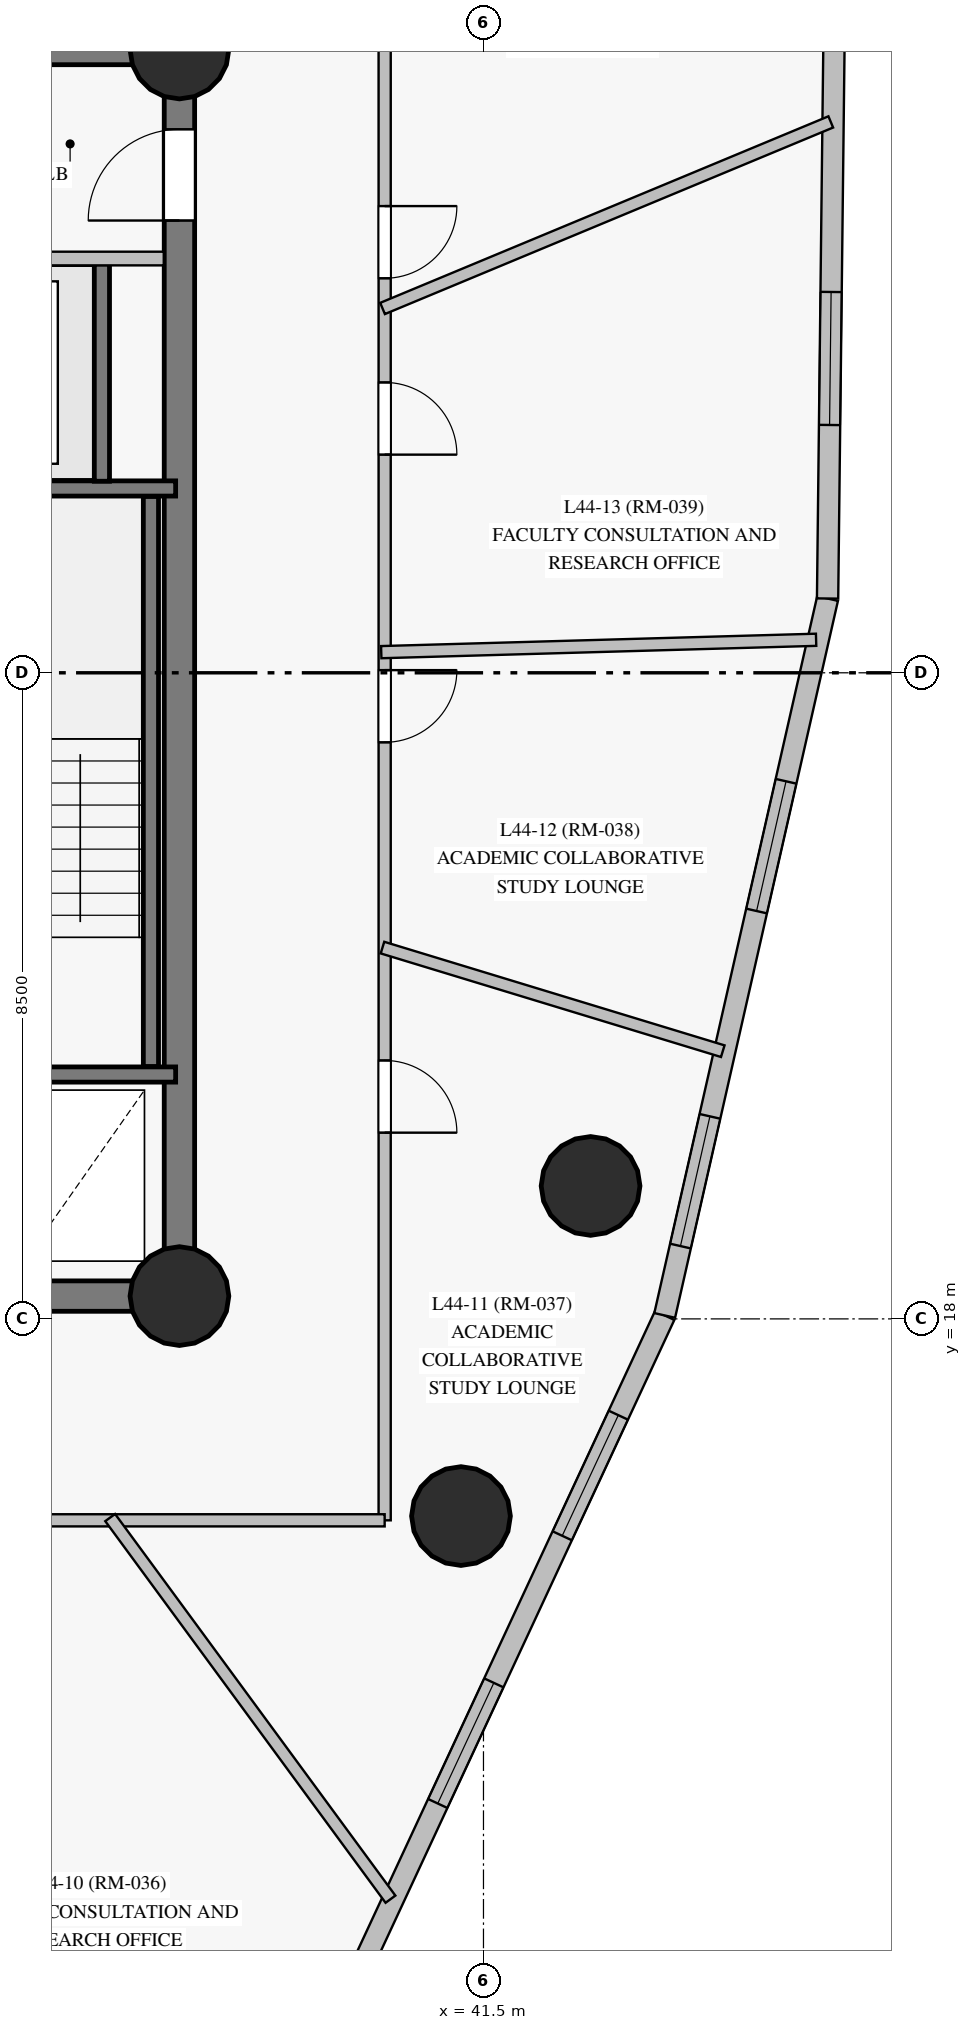
"""IFC4 building model, lengths in metres.
Left out: names, types, materials, properties, quantities, classifications, styles, units other than length and angle.
Written with IfcOpenShell. Run it as: python <this file> out.ifc"""

import sys

from ifc_helpers import new_model, si_unit, direction, frame, frame_2d, origin, origin_with_axes, origin_2d, place, context, subcontext, project, spatial, rectangle, circle, extrude, source, transform, mapped, element, fill, save


model = new_model("IFC4")
c1 = context("Model", 3, precision=1e-05, world=origin(), true_north=direction((0.0, 1.0)))
c2 = subcontext(c1, "Body", "Model", "MODEL_VIEW")
j1 = project(units=[si_unit("LENGTHUNIT", "METRE"), si_unit("PLANEANGLEUNIT", "RADIAN")], contexts=[c1])
p1 = place(None, origin())
s1 = spatial("IfcSite", under=j1, at=p1, CompositionType="ELEMENT")
p2 = place(p1, origin())
s2 = spatial("IfcBuilding", under=s1, at=p2, CompositionType="ELEMENT")
p3 = place(p2, frame((0.0, 0.0, 156.55)))
s3 = spatial("IfcBuildingStorey", under=s2, at=p3, CompositionType="ELEMENT", Elevation=156.55)
p4 = place(p3, frame((26.55, 18.3, 0.0), z_axis=(0.0, 0.0, 1.0), x_axis=(1.0, 0.0, 0.0)))
e1 = element("IfcWall", 1, at=p4, inside=s3, PredefinedType="SHEAR", context=c2, shape_type="SweptSolid", body=[
    extrude(rectangle(XDim=10.95, YDim=0.4, at=frame_2d((5.475, 0.0))), origin(), (0.0, 0.0, 1.0), 2.825),
])
p5 = place(p4, frame((4.55, 0.0, 0.0)))
e2 = element("IfcOpeningElement", 2, at=p5, cuts=e1, PredefinedType="OPENING", context=c2, shape_type="SweptSolid", body=[
    extrude(rectangle(XDim=1.4, YDim=2.2, at=frame_2d((0.7, 1.1))), frame((0.0, 0.21, 0.0), z_axis=(0.0, -1.0, 0.0), x_axis=(1.0, 0.0, 0.0)), (0.0, 0.0, 1.0), 0.42),
])
p6 = place(p3, frame((37.5, 18.3, 0.0), z_axis=(0.0, 0.0, 1.0), x_axis=(0.0, 1.0, 0.0)))
e3 = element("IfcWall", 3, at=p6, inside=s3, PredefinedType="SHEAR", context=c2, shape_type="SweptSolid", body=[
    extrude(rectangle(XDim=16.4, YDim=0.4, at=frame_2d((8.2, 0.0))), origin(), (0.0, 0.0, 1.0), 2.825),
])
p7 = place(p6, frame((14.15, 0.0, 0.0)))
e4 = element("IfcOpeningElement", 4, at=p7, cuts=e3, PredefinedType="OPENING", context=c2, shape_type="SweptSolid", body=[
    extrude(rectangle(XDim=1.2, YDim=2.15, at=frame_2d((0.6, 1.075))), frame((0.0, 0.21, 0.0), z_axis=(0.0, -1.0, 0.0), x_axis=(1.0, 0.0, 0.0)), (0.0, 0.0, 1.0), 0.42),
])
p8 = place(p3, frame((37.5, 34.7, 0.0), z_axis=(0.0, 0.0, 1.0), x_axis=(-1.0, 0.0, 0.0)))
e5 = element("IfcWall", 5, at=p8, inside=s3, PredefinedType="SHEAR", context=c2, shape_type="SweptSolid", body=[
    extrude(rectangle(XDim=10.95, YDim=0.4, at=frame_2d((5.475, 0.0))), origin(), (0.0, 0.0, 1.0), 2.825),
])
p9 = place(p8, frame((2.15, 0.0, 0.0)))
e6 = element("IfcOpeningElement", 6, at=p9, cuts=e5, PredefinedType="OPENING", context=c2, shape_type="SweptSolid", body=[
    extrude(rectangle(XDim=1.2, YDim=2.15, at=frame_2d((0.6, 1.075))), frame((0.0, 0.21, 0.0), z_axis=(0.0, -1.0, 0.0), x_axis=(1.0, 0.0, 0.0)), (0.0, 0.0, 1.0), 0.42),
])
p10 = place(p8, frame((6.35, 0.0, 0.0)))
e7 = element("IfcOpeningElement", 7, at=p10, cuts=e5, PredefinedType="OPENING", context=c2, shape_type="SweptSolid", body=[
    extrude(rectangle(XDim=1.1, YDim=2.15, at=frame_2d((0.55, 1.075))), frame((0.0, 0.21, 0.0), z_axis=(0.0, -1.0, 0.0), x_axis=(1.0, 0.0, 0.0)), (0.0, 0.0, 1.0), 0.42),
])
m1 = source(origin_with_axes(), c2, "Body", "SweptSolid", [
    extrude(circle(Radius=0.65, at=origin_2d()), origin(), (0.0, 0.0, 1.0), 3.05),
])
for number, where, z_axis, x_axis in (
    (8, (37.5, 18.3, 0.0), (0.0, 0.0, 1.0), (1.0, 0.0, 0.0)),
    (9, (37.5, 34.7, 0.0), (0.0, 0.0, 1.0), (1.0, 0.0, 0.0)),
    (10, (42.909, 19.749, 0.0), (0.0, 0.0, 1.0), (1.0, 0.0, 0.0)),
    (11, (41.204, 15.406, 0.0), (0.0, 0.0, 1.0), (1.0, 0.0, 0.0)),
):
    element("IfcColumn", number, at=place(p3, frame(where, z_axis=z_axis, x_axis=x_axis)), inside=s3, PredefinedType="COLUMN", context=c2, shape_type="MappedRepresentation", body=[
        mapped(m1, transform((0.0, 0.0, 0.0), scale=1.0)),
    ])
p11 = place(p3, frame((38.012, 5.417, 0.0), z_axis=(0.0, 0.0, 1.0), x_axis=(0.421677791248, 0.906745741853, 0.0)))
e12 = element("IfcWall", 12, at=p11, inside=s3, PredefinedType="SOLIDWALL", context=c2, shape_type="SweptSolid", body=[
    extrude(rectangle(XDim=13.927, YDim=0.28, at=frame_2d((6.963, 0.0))), origin(), (0.0, 0.0, 1.0), 2.825),
])
p12 = place(p11, frame((1.884, 0.0, 0.85)))
e13 = element("IfcOpeningElement", 13, at=p12, cuts=e12, PredefinedType="OPENING", context=c2, shape_type="SweptSolid", body=[
    extrude(rectangle(XDim=1.75, YDim=1.65, at=frame_2d((0.875, 0.825))), frame((0.0, 0.15, 0.0), z_axis=(0.0, -1.0, 0.0), x_axis=(1.0, 0.0, 0.0)), (0.0, 0.0, 1.0), 0.3),
])
p13 = place(p11, frame((6.846, 0.0, 0.85)))
e14 = element("IfcOpeningElement", 14, at=p13, cuts=e12, PredefinedType="OPENING", context=c2, shape_type="SweptSolid", body=[
    extrude(rectangle(XDim=1.75, YDim=1.65, at=frame_2d((0.875, 0.825))), frame((0.0, 0.15, 0.0), z_axis=(0.0, -1.0, 0.0), x_axis=(1.0, 0.0, 0.0)), (0.0, 0.0, 1.0), 0.3),
])
p14 = place(p11, frame((10.729, 0.0, 0.85)))
e15 = element("IfcOpeningElement", 15, at=p14, cuts=e12, PredefinedType="OPENING", context=c2, shape_type="SweptSolid", body=[
    extrude(rectangle(XDim=1.75, YDim=1.65, at=frame_2d((0.875, 0.825))), frame((0.0, 0.15, 0.0), z_axis=(0.0, -1.0, 0.0), x_axis=(1.0, 0.0, 0.0)), (0.0, 0.0, 1.0), 0.3),
])
p15 = place(p3, frame((43.884, 18.045, 0.0), z_axis=(0.0, 0.0, 1.0), x_axis=(0.221543643077, 0.975150457218, 0.0)))
e16 = element("IfcWall", 16, at=p15, inside=s3, PredefinedType="SOLIDWALL", context=c2, shape_type="SweptSolid", body=[
    extrude(rectangle(XDim=9.672, YDim=0.28, at=frame_2d((4.836, 0.0))), origin(), (0.0, 0.0, 1.0), 2.825),
])
p16 = place(p15, frame((0.936, 0.0, 0.85)))
e17 = element("IfcOpeningElement", 17, at=p16, cuts=e16, PredefinedType="OPENING", context=c2, shape_type="SweptSolid", body=[
    extrude(rectangle(XDim=1.75, YDim=1.65, at=frame_2d((0.875, 0.825))), frame((0.0, 0.15, 0.0), z_axis=(0.0, -1.0, 0.0), x_axis=(1.0, 0.0, 0.0)), (0.0, 0.0, 1.0), 0.3),
])
p17 = place(p15, frame((5.456, 0.0, 0.85)))
e18 = element("IfcOpeningElement", 18, at=p17, cuts=e16, PredefinedType="OPENING", context=c2, shape_type="SweptSolid", body=[
    extrude(rectangle(XDim=1.75, YDim=1.65, at=frame_2d((0.875, 0.825))), frame((0.0, 0.15, 0.0), z_axis=(0.0, -1.0, 0.0), x_axis=(1.0, 0.0, 0.0)), (0.0, 0.0, 1.0), 0.3),
])
p18 = place(p3, frame((46.027, 27.477, 0.0), z_axis=(0.0, 0.0, 1.0), x_axis=(0.011517670731, 0.999933669431, 0.0)))
e19 = element("IfcWall", 19, at=p18, inside=s3, PredefinedType="SOLIDWALL", context=c2, shape_type="SweptSolid", body=[
    extrude(rectangle(XDim=13.927, YDim=0.28, at=frame_2d((6.963, 0.0))), origin(), (0.0, 0.0, 1.0), 2.825),
])
p19 = place(p18, frame((2.283, 0.0, 0.85)))
e20 = element("IfcOpeningElement", 20, at=p19, cuts=e19, PredefinedType="OPENING", context=c2, shape_type="SweptSolid", body=[
    extrude(rectangle(XDim=1.75, YDim=1.65, at=frame_2d((0.875, 0.825))), frame((0.0, 0.15, 0.0), z_axis=(0.0, -1.0, 0.0), x_axis=(1.0, 0.0, 0.0)), (0.0, 0.0, 1.0), 0.3),
])
p20 = place(p18, frame((9.018, 0.0, 0.85)))
e21 = element("IfcOpeningElement", 21, at=p20, cuts=e19, PredefinedType="OPENING", context=c2, shape_type="SweptSolid", body=[
    extrude(rectangle(XDim=1.75, YDim=1.65, at=frame_2d((0.875, 0.825))), frame((0.0, 0.15, 0.0), z_axis=(0.0, -1.0, 0.0), x_axis=(1.0, 0.0, 0.0)), (0.0, 0.0, 1.0), 0.3),
])
p21 = place(p3, frame((37.125, 21.32, 0.0), z_axis=(0.0, 0.0, 1.0), x_axis=(0.0, 1.0, 0.0)))
e22 = element("IfcWall", 22, at=p21, inside=s3, PredefinedType="SHEAR", context=c2, shape_type="SweptSolid", body=[
    extrude(rectangle(XDim=7.5, YDim=0.2, at=frame_2d((3.75, 0.0))), origin(), (0.0, 0.0, 1.0), 2.825),
])
for number, where, z_axis, x_axis in (
    (23, (33.455, 21.215, 0.0), (0.0, 0.0, 1.0), (1.0, 0.0, 0.0)),
    (24, (33.455, 28.925, 0.0), (0.0, 0.0, 1.0), (1.0, 0.0, 0.0)),
):
    element("IfcWall", number, at=place(p3, frame(where, z_axis=z_axis, x_axis=x_axis)), inside=s3, PredefinedType="SHEAR", context=c2, shape_type="SweptSolid", body=[
        extrude(rectangle(XDim=3.995, YDim=0.2, at=frame_2d((1.998, 0.0))), origin(), (0.0, 0.0, 1.0), 2.825),
    ])
p22 = place(p3, frame((36.48, 29.02, 0.0), z_axis=(0.0, 0.0, 1.0), x_axis=(0.0, 1.0, 0.0)))
e25 = element("IfcWall", 25, at=p22, inside=s3, PredefinedType="SHEAR", context=c2, shape_type="SweptSolid", body=[
    extrude(rectangle(XDim=2.86, YDim=0.2, at=frame_2d((1.43, 0.0))), origin(), (0.0, 0.0, 1.0), 2.825),
])
p23 = place(p3, frame((40.2, 37.65, 0.0), z_axis=(0.0, 0.0, 1.0), x_axis=(0.0, -1.0, 0.0)))
e26 = element("IfcWall", 26, at=p23, inside=s3, PredefinedType="PARTITIONING", context=c2, shape_type="SweptSolid", body=[
    extrude(rectangle(XDim=22.3, YDim=0.16, at=frame_2d((11.15, 0.0))), origin(), (0.0, 0.0, 1.0), 2.375),
])
p24 = place(p23, frame((16.25, 0.0, 0.0)))
e27 = element("IfcOpeningElement", 27, at=p24, cuts=e26, PredefinedType="OPENING", context=c2, shape_type="SweptSolid", body=[
    extrude(rectangle(XDim=0.95, YDim=2.15, at=frame_2d((0.475, 1.075))), frame((0.0, 0.09, 0.0), z_axis=(0.0, -1.0, 0.0), x_axis=(1.0, 0.0, 0.0)), (0.0, 0.0, 1.0), 0.18),
])
p25 = place(p23, frame((11.115, 0.0, 0.0)))
e28 = element("IfcOpeningElement", 28, at=p25, cuts=e26, PredefinedType="OPENING", context=c2, shape_type="SweptSolid", body=[
    extrude(rectangle(XDim=0.95, YDim=2.15, at=frame_2d((0.475, 1.075))), frame((0.0, 0.09, 0.0), z_axis=(0.0, -1.0, 0.0), x_axis=(1.0, 0.0, 0.0)), (0.0, 0.0, 1.0), 0.18),
])
p26 = place(p23, frame((7.33, 0.0, 0.0)))
e29 = element("IfcOpeningElement", 29, at=p26, cuts=e26, PredefinedType="OPENING", context=c2, shape_type="SweptSolid", body=[
    extrude(rectangle(XDim=0.95, YDim=2.15, at=frame_2d((0.475, 1.075))), frame((0.0, 0.09, 0.0), z_axis=(0.0, -1.0, 0.0), x_axis=(1.0, 0.0, 0.0)), (0.0, 0.0, 1.0), 0.18),
])
p27 = place(p23, frame((5.01, 0.0, 0.0)))
e30 = element("IfcOpeningElement", 30, at=p27, cuts=e26, PredefinedType="OPENING", context=c2, shape_type="SweptSolid", body=[
    extrude(rectangle(XDim=0.95, YDim=2.15, at=frame_2d((0.475, 1.075))), frame((0.0, 0.09, 0.0), z_axis=(0.0, -1.0, 0.0), x_axis=(1.0, 0.0, 0.0)), (0.0, 0.0, 1.0), 0.18),
])
p28 = place(p3, frame((40.2, 15.35, 0.0), z_axis=(0.0, 0.0, 1.0), x_axis=(-1.0, 0.0, 0.0)))
e31 = element("IfcWall", 31, at=p28, inside=s3, PredefinedType="PARTITIONING", context=c2, shape_type="SweptSolid", body=[
    extrude(rectangle(XDim=10.65, YDim=0.16, at=frame_2d((5.325, 0.0))), origin(), (0.0, 0.0, 1.0), 2.275),
])
p29 = place(p28, frame((9.047, 0.0, 0.0)))
e32 = element("IfcOpeningElement", 32, at=p29, cuts=e31, PredefinedType="OPENING", context=c2, shape_type="SweptSolid", body=[
    extrude(rectangle(XDim=0.95, YDim=2.15, at=frame_2d((0.475, 1.075))), frame((0.0, 0.09, 0.0), z_axis=(0.0, -1.0, 0.0), x_axis=(1.0, 0.0, 0.0)), (0.0, 0.0, 1.0), 0.18),
])
p30 = place(p28, frame((4.85, 0.0, 0.0)))
e33 = element("IfcOpeningElement", 33, at=p30, cuts=e31, PredefinedType="OPENING", context=c2, shape_type="SweptSolid", body=[
    extrude(rectangle(XDim=0.95, YDim=2.15, at=frame_2d((0.475, 1.075))), frame((0.0, 0.09, 0.0), z_axis=(0.0, -1.0, 0.0), x_axis=(1.0, 0.0, 0.0)), (0.0, 0.0, 1.0), 0.18),
])
p31 = place(p3, frame((40.172, 31.293, 0.0), z_axis=(0.0, 0.0, 1.0), x_axis=(0.923236300971, 0.38423265422, 0.0)))
e34 = element("IfcWall", 34, at=p31, inside=s3, PredefinedType="PARTITIONING", context=c2, shape_type="SweptSolid", body=[
    extrude(rectangle(XDim=6.387, YDim=0.16, at=frame_2d((3.193, 0.0))), origin(), (0.0, 0.0, 1.0), 2.825),
])
p32 = place(p3, frame((36.589, 15.386, 0.0), z_axis=(0.0, 0.0, 1.0), x_axis=(0.591975139888, -0.805956223224, 0.0)))
e35 = element("IfcWall", 35, at=p32, inside=s3, PredefinedType="PARTITIONING", context=c2, shape_type="SweptSolid", body=[
    extrude(rectangle(XDim=6.229, YDim=0.16, at=frame_2d((3.115, 0.0))), origin(), (0.0, 0.0, 1.0), 2.825),
])
p33 = place(p3, frame((40.155, 26.771, 0.0), z_axis=(0.0, 0.0, 1.0), x_axis=(0.999595142598, 0.028452607866, 0.0)))
e36 = element("IfcWall", 36, at=p33, inside=s3, PredefinedType="PARTITIONING", context=c2, shape_type="SweptSolid", body=[
    extrude(rectangle(XDim=5.723, YDim=0.16, at=frame_2d((2.862, 0.0))), origin(), (0.0, 0.0, 1.0), 2.825),
])
p34 = place(p3, frame((40.171, 22.885, 0.0), z_axis=(0.0, 0.0, 1.0), x_axis=(0.956656819461, -0.291217667352, 0.0)))
e37 = element("IfcWall", 37, at=p34, inside=s3, PredefinedType="PARTITIONING", context=c2, shape_type="SweptSolid", body=[
    extrude(rectangle(XDim=4.68, YDim=0.16, at=frame_2d((2.34, 0.0))), origin(), (0.0, 0.0, 1.0), 2.825),
])
p35 = place(p3, frame((33.535, 31.95, 0.0), z_axis=(0.0, 0.0, 1.0), x_axis=(1.0, 0.0, 0.0)))
e38 = element("IfcWall", 38, at=p35, inside=s3, PredefinedType="PARTITIONING", context=c2, shape_type="SweptSolid", body=[
    extrude(rectangle(XDim=3.759, YDim=0.18, at=frame_2d((1.879, 0.0))), origin(), (0.0, 0.0, 1.0), 2.825),
])
p36 = place(p35, frame((0.9, 0.0, 0.0)))
e39 = element("IfcOpeningElement", 39, at=p36, cuts=e38, PredefinedType="OPENING", context=c2, shape_type="SweptSolid", body=[
    extrude(rectangle(XDim=1.3, YDim=2.2, at=frame_2d((0.65, 1.1))), frame((0.0, 0.1, 0.0), z_axis=(0.0, -1.0, 0.0), x_axis=(1.0, 0.0, 0.0)), (0.0, 0.0, 1.0), 0.2),
])
m2 = source(origin_with_axes(), c2, "Body", "SweptSolid", [
    extrude(rectangle(XDim=1.75, YDim=1.65, at=frame_2d((0.875, 0.825))), frame((0.0, 0.03, 0.0), z_axis=(0.0, -1.0, 0.0), x_axis=(1.0, 0.0, 0.0)), (0.0, 0.0, 1.0), 0.06),
])
p37 = place(p13, origin())
e40 = element("IfcWindow", 40, at=p37, inside=s3, PartitioningType="SINGLE_PANEL", PredefinedType="WINDOW", context=c2, shape_type="MappedRepresentation", body=[
    mapped(m2, transform((0.0, 0.0, 0.0), scale=1.0)),
])
fill(e14, e40)
p38 = place(p14, origin())
e41 = element("IfcWindow", 41, at=p38, inside=s3, PartitioningType="SINGLE_PANEL", PredefinedType="WINDOW", context=c2, shape_type="MappedRepresentation", body=[
    mapped(m2, transform((0.0, 0.0, 0.0), scale=1.0)),
])
fill(e15, e41)
p39 = place(p16, origin())
e42 = element("IfcWindow", 42, at=p39, inside=s3, PartitioningType="SINGLE_PANEL", PredefinedType="WINDOW", context=c2, shape_type="MappedRepresentation", body=[
    mapped(m2, transform((0.0, 0.0, 0.0), scale=1.0)),
])
fill(e17, e42)
p40 = place(p17, origin())
e43 = element("IfcWindow", 43, at=p40, inside=s3, PartitioningType="SINGLE_PANEL", PredefinedType="WINDOW", context=c2, shape_type="MappedRepresentation", body=[
    mapped(m2, transform((0.0, 0.0, 0.0), scale=1.0)),
])
fill(e18, e43)
p41 = place(p19, origin())
e44 = element("IfcWindow", 44, at=p41, inside=s3, PartitioningType="SINGLE_PANEL", PredefinedType="WINDOW", context=c2, shape_type="MappedRepresentation", body=[
    mapped(m2, transform((0.0, 0.0, 0.0), scale=1.0)),
])
fill(e20, e44)
m3 = source(origin_with_axes(), c2, "Body", "SweptSolid", [
    extrude(rectangle(XDim=1.2, YDim=2.15, at=frame_2d((0.6, 1.075))), frame((0.0, 0.025, 0.0), z_axis=(0.0, -1.0, 0.0), x_axis=(1.0, 0.0, 0.0)), (0.0, 0.0, 1.0), 0.05),
])
p42 = place(p7, origin())
e45 = element("IfcDoor", 45, at=p42, inside=s3, OperationType="SINGLE_SWING_LEFT", PredefinedType="DOOR", context=c2, shape_type="MappedRepresentation", body=[
    mapped(m3, transform((0.0, 0.0, 0.0), scale=1.0)),
])
fill(e4, e45)
m4 = source(origin_with_axes(), c2, "Body", "SweptSolid", [
    extrude(rectangle(XDim=0.95, YDim=2.15, at=frame_2d((0.475, 1.075))), frame((0.0, 0.025, 0.0), z_axis=(0.0, -1.0, 0.0), x_axis=(1.0, 0.0, 0.0)), (0.0, 0.0, 1.0), 0.05),
])
p43 = place(p24, origin())
e46 = element("IfcDoor", 46, at=p43, inside=s3, OperationType="SINGLE_SWING_RIGHT", PredefinedType="DOOR", context=c2, shape_type="MappedRepresentation", body=[
    mapped(m4, transform((0.0, 0.0, 0.0), scale=1.0)),
])
fill(e27, e46)
p44 = place(p25, origin())
e47 = element("IfcDoor", 47, at=p44, inside=s3, OperationType="SINGLE_SWING_LEFT", PredefinedType="DOOR", context=c2, shape_type="MappedRepresentation", body=[
    mapped(m4, transform((0.0, 0.0, 0.0), scale=1.0)),
])
fill(e28, e47)
p45 = place(p26, origin())
e48 = element("IfcDoor", 48, at=p45, inside=s3, OperationType="SINGLE_SWING_RIGHT", PredefinedType="DOOR", context=c2, shape_type="MappedRepresentation", body=[
    mapped(m4, transform((0.0, 0.0, 0.0), scale=1.0)),
])
fill(e29, e48)
p46 = place(p27, origin())
e49 = element("IfcDoor", 49, at=p46, inside=s3, OperationType="SINGLE_SWING_LEFT", PredefinedType="DOOR", context=c2, shape_type="MappedRepresentation", body=[
    mapped(m4, transform((0.0, 0.0, 0.0), scale=1.0)),
])
fill(e30, e49)
save(model, sys.argv[1])
